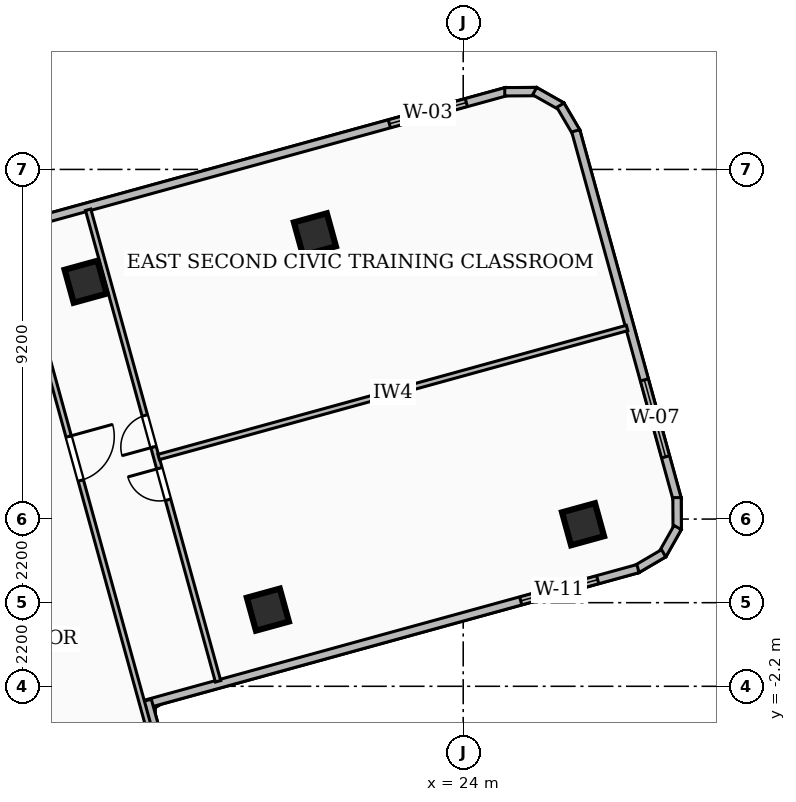
"""IFC4 building model, lengths in metres.
Left out: names, types, materials, properties, quantities, classifications, styles, units other than length and angle.
Written with IfcOpenShell. Run it as: python <this file> out.ifc"""

import sys

from ifc_helpers import new_model, si_unit, direction, frame, frame_2d, origin, origin_2d, place, context, subcontext, project, spatial, rectangle, extrude, element, fill, save


model = new_model("IFC4")
c1 = context("Model", 3, precision=1e-05, world=origin(), true_north=direction((0.0, 1.0)))
c2 = subcontext(c1, "Body", "Model", "MODEL_VIEW")
j1 = project(units=[si_unit("LENGTHUNIT", "METRE"), si_unit("PLANEANGLEUNIT", "RADIAN")], contexts=[c1])
p1 = place(None, origin())
s1 = spatial("IfcSite", under=j1, at=p1, CompositionType="ELEMENT")
p2 = place(p1, origin())
s2 = spatial("IfcBuilding", under=s1, at=p2, CompositionType="ELEMENT")
p3 = place(p2, frame((0.0, 0.0, 134.28)))
s3 = spatial("IfcBuildingStorey", under=s2, at=p3, CompositionType="ELEMENT", Elevation=134.28)
for number, where, z_axis, x_axis in (
    (1, (18.86, -0.183, 0.0), (0.0, 0.0, 1.0), (0.964, 0.266, 0.0)),
    (2, (14.064, 8.445, 0.0), (0.0, 0.0, 1.0), (0.964, 0.266, 0.0)),
    (3, (27.153, 2.064, 0.0), (0.0, 0.0, 1.0), (0.964, 0.266, 0.0)),
    (4, (20.098, 9.692, 0.0), (0.0, 0.0, 1.0), (0.964, 0.266, 0.0)),
):
    element("IfcColumn", number, at=place(p3, frame(where, z_axis=z_axis, x_axis=x_axis)), inside=s3, PredefinedType="COLUMN", context=c2, shape_type="SweptSolid", body=[
        extrude(rectangle(XDim=0.9, YDim=0.9, at=origin_2d()), origin(), (0.0, 0.0, 1.0), 3.6),
    ])
p4 = place(p3, frame((12.166, 9.876, 0.0), z_axis=(0.0, 0.0, 1.0), x_axis=(0.964099811745, 0.2655401156, 0.0)))
e5 = element("IfcWall", 5, at=p4, inside=s3, PredefinedType="SOLIDWALL", context=c2, shape_type="SweptSolid", body=[
    extrude(rectangle(XDim=13.459, YDim=0.22, at=frame_2d((6.729, 0.0))), origin(), (0.0, 0.0, 1.0), 3.32),
])
p5 = place(p4, frame((10.259, 0.0, 0.85)))
e6 = element("IfcOpeningElement", 6, at=p5, cuts=e5, PredefinedType="OPENING", context=c2, shape_type="SweptSolid", body=[
    extrude(rectangle(XDim=2.1, YDim=2.0, at=frame_2d((1.05, 1.0))), frame((0.0, 0.12, 0.0), z_axis=(0.0, -1.0, 0.0), x_axis=(1.0, 0.0, 0.0)), (0.0, 0.0, 1.0), 0.24),
])
p6 = place(p3, frame((25.093, 13.443, 0.0), z_axis=(0.0, 0.0, 1.0), x_axis=(0.999982861094, 0.005854700592, 0.0)))
e7 = element("IfcWall", 7, at=p6, inside=s3, PredefinedType="SOLIDWALL", context=c2, shape_type="SweptSolid", body=[
    extrude(rectangle(XDim=0.834, YDim=0.22, at=frame_2d((0.417, 0.0))), origin(), (0.0, 0.0, 1.0), 3.32),
])
p7 = place(p3, frame((25.88, 13.46, 0.0), z_axis=(0.0, 0.0, 1.0), x_axis=(0.87005199541, -0.492959963164, 0.0)))
e8 = element("IfcWall", 8, at=p7, inside=s3, PredefinedType="SOLIDWALL", context=c2, shape_type="SweptSolid", body=[
    extrude(rectangle(XDim=0.82, YDim=0.22, at=frame_2d((0.41, 0.0))), origin(), (0.0, 0.0, 1.0), 3.32),
])
p8 = place(p3, frame((26.558, 13.09, 0.0), z_axis=(0.0, 0.0, 1.0), x_axis=(0.506432207312, -0.862279780232, 0.0)))
e9 = element("IfcWall", 9, at=p8, inside=s3, PredefinedType="SOLIDWALL", context=c2, shape_type="SweptSolid", body=[
    extrude(rectangle(XDim=0.835, YDim=0.22, at=frame_2d((0.417, 0.0))), origin(), (0.0, 0.0, 1.0), 3.32),
])
p9 = place(p3, frame((26.961, 12.416, 0.0), z_axis=(0.0, 0.0, 1.0), x_axis=(0.265584520086, -0.964087580405, 0.0)))
e10 = element("IfcWall", 10, at=p9, inside=s3, PredefinedType="SOLIDWALL", context=c2, shape_type="SweptSolid", body=[
    extrude(rectangle(XDim=10.061, YDim=0.22, at=frame_2d((5.031, 0.0))), origin(), (0.0, 0.0, 1.0), 3.32),
])
p10 = place(p9, frame((6.798, 0.0, 0.85)))
e11 = element("IfcOpeningElement", 11, at=p10, cuts=e10, PredefinedType="OPENING", context=c2, shape_type="SweptSolid", body=[
    extrude(rectangle(XDim=2.1, YDim=1.8, at=frame_2d((1.05, 0.9))), frame((0.0, 0.12, 0.0), z_axis=(0.0, -1.0, 0.0), x_axis=(1.0, 0.0, 0.0)), (0.0, 0.0, 1.0), 0.24),
])
p11 = place(p3, frame((29.626, 2.765, 0.0), z_axis=(0.0, 0.0, 1.0), x_axis=(0.006147424822, -0.999981104406, 0.0)))
e12 = element("IfcWall", 12, at=p11, inside=s3, PredefinedType="SOLIDWALL", context=c2, shape_type="SweptSolid", body=[
    extrude(rectangle(XDim=0.834, YDim=0.22, at=frame_2d((0.417, 0.0))), origin(), (0.0, 0.0, 1.0), 3.32),
])
p12 = place(p3, frame((29.643, 1.978, 0.0), z_axis=(0.0, 0.0, 1.0), x_axis=(-0.492057256668, -0.87056283872, 0.0)))
e13 = element("IfcWall", 13, at=p12, inside=s3, PredefinedType="SOLIDWALL", context=c2, shape_type="SweptSolid", body=[
    extrude(rectangle(XDim=0.819, YDim=0.22, at=frame_2d((0.41, 0.0))), origin(), (0.0, 0.0, 1.0), 3.32),
])
p13 = place(p3, frame((29.274, 1.3, 0.0), z_axis=(0.0, 0.0, 1.0), x_axis=(-0.862451814289, -0.506139178517, 0.0)))
e14 = element("IfcWall", 14, at=p13, inside=s3, PredefinedType="SOLIDWALL", context=c2, shape_type="SweptSolid", body=[
    extrude(rectangle(XDim=0.836, YDim=0.22, at=frame_2d((0.418, 0.0))), origin(), (0.0, 0.0, 1.0), 3.32),
])
p14 = place(p3, frame((28.599, 0.897, 0.0), z_axis=(0.0, 0.0, 1.0), x_axis=(-0.964113270695, -0.265491245185, 0.0)))
e15 = element("IfcWall", 15, at=p14, inside=s3, PredefinedType="SOLIDWALL", context=c2, shape_type="SweptSolid", body=[
    extrude(rectangle(XDim=13.458, YDim=0.22, at=frame_2d((6.729, 0.0))), origin(), (0.0, 0.0, 1.0), 3.32),
])
p15 = place(p14, frame((1.1, 0.0, 0.85)))
e16 = element("IfcOpeningElement", 16, at=p15, cuts=e15, PredefinedType="OPENING", context=c2, shape_type="SweptSolid", body=[
    extrude(rectangle(XDim=2.1, YDim=1.6, at=frame_2d((1.05, 0.8))), frame((0.0, 0.12, 0.0), z_axis=(0.0, -1.0, 0.0), x_axis=(1.0, 0.0, 0.0)), (0.0, 0.0, 1.0), 0.24),
])
p16 = place(p3, frame((15.686, -2.568, 0.0), z_axis=(0.0, 0.0, 1.0), x_axis=(0.265558779784, -0.964094670911, 0.0)))
e17 = element("IfcWall", 17, at=p16, inside=s3, PredefinedType="SOLIDWALL", context=c2, shape_type="SweptSolid", body=[
    extrude(rectangle(XDim=6.319, YDim=0.22, at=frame_2d((3.159, 0.0))), origin(), (0.0, 0.0, 1.0), 3.32),
])
p17 = place(p3, frame((10.999, 13.879, 0.0), z_axis=(0.0, 0.0, 1.0), x_axis=(0.26558288107, -0.964088031915, 0.0)))
e18 = element("IfcWall", 18, at=p17, inside=s3, PredefinedType="PARTITIONING", context=c2, shape_type="SweptSolid", body=[
    extrude(rectangle(XDim=20.479, YDim=0.145, at=frame_2d((10.24, 0.0))), origin(), (0.0, 0.0, 1.0), 2.55),
])
p18 = place(p17, frame((9.86, 0.0, 0.0)))
e19 = element("IfcOpeningElement", 19, at=p18, cuts=e18, PredefinedType="OPENING", context=c2, shape_type="SweptSolid", body=[
    extrude(rectangle(XDim=1.2, YDim=2.1, at=frame_2d((0.6, 1.05))), frame((0.0, 0.083, 0.0), z_axis=(0.0, -1.0, 0.0), x_axis=(1.0, 0.0, 0.0)), (0.0, 0.0, 1.0), 0.165),
])
p19 = place(p3, frame((15.986, 3.833, 0.0), z_axis=(0.0, 0.0, 1.0), x_axis=(0.964097539176, 0.265548366506, 0.0)))
e20 = element("IfcWall", 20, at=p19, inside=s3, PredefinedType="PARTITIONING", context=c2, shape_type="SweptSolid", body=[
    extrude(rectangle(XDim=12.785, YDim=0.145, at=frame_2d((6.393, 0.0))), origin(), (0.0, 0.0, 1.0), 2.812),
])
p20 = place(p3, frame((17.549, -2.069, 0.0), z_axis=(0.0, 0.0, 1.0), x_axis=(-0.265569130282, 0.964091819819, 0.0)))
e21 = element("IfcWall", 21, at=p20, inside=s3, PredefinedType="PARTITIONING", context=c2, shape_type="SweptSolid", body=[
    extrude(rectangle(XDim=12.87, YDim=0.145, at=frame_2d((6.435, 0.0))), origin(), (0.0, 0.0, 1.0), 2.55),
])
p21 = place(p20, frame((4.955, 0.0, 0.0)))
e22 = element("IfcOpeningElement", 22, at=p21, cuts=e21, PredefinedType="OPENING", context=c2, shape_type="SweptSolid", body=[
    extrude(rectangle(XDim=0.86, YDim=2.04, at=frame_2d((0.43, 1.02))), frame((0.0, 0.083, 0.0), z_axis=(0.0, -1.0, 0.0), x_axis=(1.0, 0.0, 0.0)), (0.0, 0.0, 1.0), 0.165),
])
p22 = place(p20, frame((6.395, 0.0, 0.0)))
e23 = element("IfcOpeningElement", 23, at=p22, cuts=e21, PredefinedType="OPENING", context=c2, shape_type="SweptSolid", body=[
    extrude(rectangle(XDim=0.86, YDim=2.04, at=frame_2d((0.43, 1.02))), frame((0.0, 0.083, 0.0), z_axis=(0.0, -1.0, 0.0), x_axis=(1.0, 0.0, 0.0)), (0.0, 0.0, 1.0), 0.165),
])
p23 = place(p5, origin())
e24 = element("IfcWindow", 24, at=p23, inside=s3, PartitioningType="SINGLE_PANEL", PredefinedType="WINDOW", context=c2, shape_type="SweptSolid", body=[
    extrude(rectangle(XDim=2.1, YDim=2.0, at=frame_2d((1.05, 1.0))), frame((0.0, 0.03, 0.0), z_axis=(0.0, -1.0, 0.0), x_axis=(1.0, 0.0, 0.0)), (0.0, 0.0, 1.0), 0.06),
])
fill(e6, e24)
p24 = place(p10, origin())
e25 = element("IfcWindow", 25, at=p24, inside=s3, PartitioningType="SINGLE_PANEL", PredefinedType="WINDOW", context=c2, shape_type="SweptSolid", body=[
    extrude(rectangle(XDim=2.1, YDim=1.8, at=frame_2d((1.05, 0.9))), frame((0.0, 0.03, 0.0), z_axis=(0.0, -1.0, 0.0), x_axis=(1.0, 0.0, 0.0)), (0.0, 0.0, 1.0), 0.06),
])
fill(e11, e25)
p25 = place(p15, origin())
e26 = element("IfcWindow", 26, at=p25, inside=s3, PartitioningType="SINGLE_PANEL", PredefinedType="WINDOW", context=c2, shape_type="SweptSolid", body=[
    extrude(rectangle(XDim=2.1, YDim=1.6, at=frame_2d((1.05, 0.8))), frame((0.0, 0.03, 0.0), z_axis=(0.0, -1.0, 0.0), x_axis=(1.0, 0.0, 0.0)), (0.0, 0.0, 1.0), 0.06),
])
fill(e16, e26)
p26 = place(p18, origin())
e27 = element("IfcDoor", 27, at=p26, inside=s3, OperationType="SINGLE_SWING_LEFT", PredefinedType="DOOR", context=c2, shape_type="SweptSolid", body=[
    extrude(rectangle(XDim=1.2, YDim=2.1, at=frame_2d((0.6, 1.05))), frame((0.0, 0.025, 0.0), z_axis=(0.0, -1.0, 0.0), x_axis=(1.0, 0.0, 0.0)), (0.0, 0.0, 1.0), 0.05),
])
fill(e19, e27)
p27 = place(p21, origin())
e28 = element("IfcDoor", 28, at=p27, inside=s3, OperationType="SINGLE_SWING_RIGHT", PredefinedType="DOOR", context=c2, shape_type="SweptSolid", body=[
    extrude(rectangle(XDim=0.86, YDim=2.04, at=frame_2d((0.43, 1.02))), frame((0.0, 0.025, 0.0), z_axis=(0.0, -1.0, 0.0), x_axis=(1.0, 0.0, 0.0)), (0.0, 0.0, 1.0), 0.05),
])
fill(e22, e28)
p28 = place(p22, origin())
e29 = element("IfcDoor", 29, at=p28, inside=s3, OperationType="SINGLE_SWING_LEFT", PredefinedType="DOOR", context=c2, shape_type="SweptSolid", body=[
    extrude(rectangle(XDim=0.86, YDim=2.04, at=frame_2d((0.43, 1.02))), frame((0.0, 0.025, 0.0), z_axis=(0.0, -1.0, 0.0), x_axis=(1.0, 0.0, 0.0)), (0.0, 0.0, 1.0), 0.05),
])
fill(e23, e29)
save(model, sys.argv[1])
